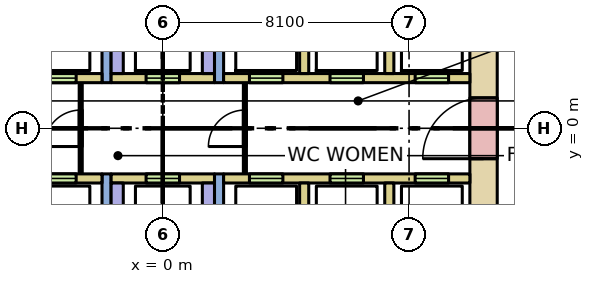
"""IFC4 building model, lengths in metres.
Left out: names, types, materials, properties, quantities, classifications, styles, units other than length and angle.
Written with IfcOpenShell. Run it as: python <this file> out.ifc"""

import sys

from ifc_helpers import new_model, si_unit, direction, frame, frame_2d, origin, place, context, subcontext, project, spatial, rectangle, extrude, element, fill, save


model = new_model("IFC4")
c1 = context("Model", 3, precision=1e-05, world=origin(), true_north=direction((0.0, 1.0)))
c2 = subcontext(c1, "Body", "Model", "MODEL_VIEW")
j1 = project(units=[si_unit("LENGTHUNIT", "METRE"), si_unit("PLANEANGLEUNIT", "RADIAN")], contexts=[c1])
p1 = place(None, origin())
s1 = spatial("IfcSite", under=j1, at=p1, CompositionType="ELEMENT")
p2 = place(p1, origin())
s2 = spatial("IfcBuilding", under=s1, at=p2, CompositionType="ELEMENT")
p3 = place(p2, origin())
s3 = spatial("IfcBuildingStorey", under=s2, at=p3, CompositionType="ELEMENT", Elevation=0.0)
p4 = place(p3, frame((10.55, -5.13, -0.32), z_axis=(0.0, 0.0, 1.0), x_axis=(0.0, 1.0, 0.0)))
e1 = element("IfcWall", 1, at=p4, inside=s3, PredefinedType="SHEAR", context=c2, shape_type="SweptSolid", body=[
    extrude(rectangle(XDim=10.26, YDim=0.9, at=frame_2d((5.13, 0.0))), origin(), (0.0, 0.0, 1.0), 6.0),
])
p5 = place(p4, frame((4.13, 0.0, 0.32)))
e2 = element("IfcOpeningElement", 2, at=p5, cuts=e1, PredefinedType="OPENING", context=c2, shape_type="SweptSolid", body=[
    extrude(rectangle(XDim=2.0, YDim=2.1, at=frame_2d((1.0, 1.05))), frame((0.0, 0.46, 0.0), z_axis=(0.0, -1.0, 0.0), x_axis=(1.0, 0.0, 0.0)), (0.0, 0.0, 1.0), 0.92),
])
p6 = place(p3, frame((-10.1, 1.65, 0.0), z_axis=(0.0, 0.0, 1.0), x_axis=(1.0, 0.0, 0.0)))
e3 = element("IfcWall", 3, at=p6, inside=s3, PredefinedType="SOLIDWALL", context=c2, shape_type="SweptSolid", body=[
    extrude(rectangle(XDim=8.1, YDim=0.3, at=frame_2d((4.05, 0.0))), origin(), (0.0, 0.0, 1.0), 5.68),
])
p7 = place(p6, frame((0.7, 0.0, 0.0)))
e4 = element("IfcOpeningElement", 4, at=p7, cuts=e3, PredefinedType="OPENING", context=c2, shape_type="SweptSolid", body=[
    extrude(rectangle(XDim=1.1, YDim=2.1, at=frame_2d((0.55, 1.05))), frame((0.0, 0.16, 0.0), z_axis=(0.0, -1.0, 0.0), x_axis=(1.0, 0.0, 0.0)), (0.0, 0.0, 1.0), 0.32),
])
p8 = place(p6, frame((3.5, 0.0, 0.0)))
e5 = element("IfcOpeningElement", 5, at=p8, cuts=e3, PredefinedType="OPENING", context=c2, shape_type="SweptSolid", body=[
    extrude(rectangle(XDim=1.1, YDim=2.1, at=frame_2d((0.55, 1.05))), frame((0.0, 0.16, 0.0), z_axis=(0.0, -1.0, 0.0), x_axis=(1.0, 0.0, 0.0)), (0.0, 0.0, 1.0), 0.32),
])
p9 = place(p6, frame((6.15, 0.0, 0.0)))
e6 = element("IfcOpeningElement", 6, at=p9, cuts=e3, PredefinedType="OPENING", context=c2, shape_type="SweptSolid", body=[
    extrude(rectangle(XDim=1.1, YDim=2.1, at=frame_2d((0.55, 1.05))), frame((0.0, 0.16, 0.0), z_axis=(0.0, -1.0, 0.0), x_axis=(1.0, 0.0, 0.0)), (0.0, 0.0, 1.0), 0.32),
])
p10 = place(p3, frame((-10.1, -1.65, 0.0), z_axis=(0.0, 0.0, 1.0), x_axis=(1.0, 0.0, 0.0)))
e7 = element("IfcWall", 7, at=p10, inside=s3, PredefinedType="SOLIDWALL", context=c2, shape_type="SweptSolid", body=[
    extrude(rectangle(XDim=8.1, YDim=0.3, at=frame_2d((4.05, 0.0))), origin(), (0.0, 0.0, 1.0), 5.68),
])
p11 = place(p10, frame((0.7, 0.0, 0.0)))
e8 = element("IfcOpeningElement", 8, at=p11, cuts=e7, PredefinedType="OPENING", context=c2, shape_type="SweptSolid", body=[
    extrude(rectangle(XDim=1.1, YDim=2.1, at=frame_2d((0.55, 1.05))), frame((0.0, 0.16, 0.0), z_axis=(0.0, -1.0, 0.0), x_axis=(1.0, 0.0, 0.0)), (0.0, 0.0, 1.0), 0.32),
])
p12 = place(p10, frame((3.5, 0.0, 0.0)))
e9 = element("IfcOpeningElement", 9, at=p12, cuts=e7, PredefinedType="OPENING", context=c2, shape_type="SweptSolid", body=[
    extrude(rectangle(XDim=1.1, YDim=2.1, at=frame_2d((0.55, 1.05))), frame((0.0, 0.16, 0.0), z_axis=(0.0, -1.0, 0.0), x_axis=(1.0, 0.0, 0.0)), (0.0, 0.0, 1.0), 0.32),
])
p13 = place(p10, frame((6.15, 0.0, 0.0)))
e10 = element("IfcOpeningElement", 10, at=p13, cuts=e7, PredefinedType="OPENING", context=c2, shape_type="SweptSolid", body=[
    extrude(rectangle(XDim=1.1, YDim=2.1, at=frame_2d((0.55, 1.05))), frame((0.0, 0.16, 0.0), z_axis=(0.0, -1.0, 0.0), x_axis=(1.0, 0.0, 0.0)), (0.0, 0.0, 1.0), 0.32),
])
p14 = place(p3, frame((2.0, 1.65, 0.0), z_axis=(0.0, 0.0, 1.0), x_axis=(1.0, 0.0, 0.0)))
e11 = element("IfcWall", 11, at=p14, inside=s3, PredefinedType="SOLIDWALL", context=c2, shape_type="SweptSolid", body=[
    extrude(rectangle(XDim=8.1, YDim=0.3, at=frame_2d((4.05, 0.0))), origin(), (0.0, 0.0, 1.0), 5.68),
])
p15 = place(p14, frame((0.85, 0.0, 0.0)))
e12 = element("IfcOpeningElement", 12, at=p15, cuts=e11, PredefinedType="OPENING", context=c2, shape_type="SweptSolid", body=[
    extrude(rectangle(XDim=1.1, YDim=2.1, at=frame_2d((0.55, 1.05))), frame((0.0, 0.16, 0.0), z_axis=(0.0, -1.0, 0.0), x_axis=(1.0, 0.0, 0.0)), (0.0, 0.0, 1.0), 0.32),
])
p16 = place(p14, frame((3.5, 0.0, 0.0)))
e13 = element("IfcOpeningElement", 13, at=p16, cuts=e11, PredefinedType="OPENING", context=c2, shape_type="SweptSolid", body=[
    extrude(rectangle(XDim=1.1, YDim=2.1, at=frame_2d((0.55, 1.05))), frame((0.0, 0.16, 0.0), z_axis=(0.0, -1.0, 0.0), x_axis=(1.0, 0.0, 0.0)), (0.0, 0.0, 1.0), 0.32),
])
p17 = place(p14, frame((6.3, 0.0, 0.0)))
e14 = element("IfcOpeningElement", 14, at=p17, cuts=e11, PredefinedType="OPENING", context=c2, shape_type="SweptSolid", body=[
    extrude(rectangle(XDim=1.1, YDim=2.1, at=frame_2d((0.55, 1.05))), frame((0.0, 0.16, 0.0), z_axis=(0.0, -1.0, 0.0), x_axis=(1.0, 0.0, 0.0)), (0.0, 0.0, 1.0), 0.32),
])
p18 = place(p3, frame((2.0, -1.65, 0.0), z_axis=(0.0, 0.0, 1.0), x_axis=(1.0, 0.0, 0.0)))
e15 = element("IfcWall", 15, at=p18, inside=s3, PredefinedType="SOLIDWALL", context=c2, shape_type="SweptSolid", body=[
    extrude(rectangle(XDim=8.1, YDim=0.3, at=frame_2d((4.05, 0.0))), origin(), (0.0, 0.0, 1.0), 5.68),
])
p19 = place(p18, frame((0.85, 0.0, 0.0)))
e16 = element("IfcOpeningElement", 16, at=p19, cuts=e15, PredefinedType="OPENING", context=c2, shape_type="SweptSolid", body=[
    extrude(rectangle(XDim=1.1, YDim=2.1, at=frame_2d((0.55, 1.05))), frame((0.0, 0.16, 0.0), z_axis=(0.0, -1.0, 0.0), x_axis=(1.0, 0.0, 0.0)), (0.0, 0.0, 1.0), 0.32),
])
p20 = place(p18, frame((3.5, 0.0, 0.0)))
e17 = element("IfcOpeningElement", 17, at=p20, cuts=e15, PredefinedType="OPENING", context=c2, shape_type="SweptSolid", body=[
    extrude(rectangle(XDim=1.1, YDim=2.1, at=frame_2d((0.55, 1.05))), frame((0.0, 0.16, 0.0), z_axis=(0.0, -1.0, 0.0), x_axis=(1.0, 0.0, 0.0)), (0.0, 0.0, 1.0), 0.32),
])
p21 = place(p18, frame((6.3, 0.0, 0.0)))
e18 = element("IfcOpeningElement", 18, at=p21, cuts=e15, PredefinedType="OPENING", context=c2, shape_type="SweptSolid", body=[
    extrude(rectangle(XDim=1.1, YDim=2.1, at=frame_2d((0.55, 1.05))), frame((0.0, 0.16, 0.0), z_axis=(0.0, -1.0, 0.0), x_axis=(1.0, 0.0, 0.0)), (0.0, 0.0, 1.0), 0.32),
])
for number, where, z_axis, x_axis in (
    (19, (4.65, 1.8, 0.0), (0.0, 0.0, 1.0), (0.0, 1.0, 0.0)),
    (20, (4.65, -4.2, 0.0), (0.0, 0.0, 1.0), (0.0, 1.0, 0.0)),
    (21, (7.45, 1.8, 0.0), (0.0, 0.0, 1.0), (0.0, 1.0, 0.0)),
    (22, (7.45, -4.2, 0.0), (0.0, 0.0, 1.0), (0.0, 1.0, 0.0)),
):
    element("IfcWall", number, at=place(p3, frame(where, z_axis=z_axis, x_axis=x_axis)), inside=s3, PredefinedType="SOLIDWALL", context=c2, shape_type="SweptSolid", body=[
        extrude(rectangle(XDim=2.4, YDim=0.3, at=frame_2d((1.2, 0.0))), origin(), (0.0, 0.0, 1.0), 5.68),
    ])
for number, where, z_axis, x_axis in (
    (23, (-1.85, 1.5, 0.0), (0.0, 0.0, 1.0), (0.0, 1.0, 0.0)),
    (24, (-1.85, -8.1, 0.0), (0.0, 0.0, 1.0), (0.0, 1.0, 0.0)),
    (25, (1.85, 1.5, 0.0), (0.0, 0.0, 1.0), (0.0, 1.0, 0.0)),
    (26, (1.85, -8.1, 0.0), (0.0, 0.0, 1.0), (0.0, 1.0, 0.0)),
):
    element("IfcWall", number, at=place(p3, frame(where, z_axis=z_axis, x_axis=x_axis)), inside=s3, PredefinedType="SHEAR", context=c2, shape_type="SweptSolid", body=[
        extrude(rectangle(XDim=6.6, YDim=0.3, at=frame_2d((3.3, 0.0))), origin(), (0.0, 0.0, 1.0), 5.68),
    ])
p22 = place(p3, frame((-1.7, 1.65, 0.0), z_axis=(0.0, 0.0, 1.0), x_axis=(1.0, 0.0, 0.0)))
e27 = element("IfcWall", 27, at=p22, inside=s3, PredefinedType="SOLIDWALL", context=c2, shape_type="SweptSolid", body=[
    extrude(rectangle(XDim=3.4, YDim=0.3, at=frame_2d((1.7, 0.0))), origin(), (0.0, 0.0, 1.0), 5.68),
])
p23 = place(p22, frame((1.15, 0.0, 0.0)))
e28 = element("IfcOpeningElement", 28, at=p23, cuts=e27, PredefinedType="OPENING", context=c2, shape_type="SweptSolid", body=[
    extrude(rectangle(XDim=1.1, YDim=2.1, at=frame_2d((0.55, 1.05))), frame((0.0, 0.16, 0.0), z_axis=(0.0, -1.0, 0.0), x_axis=(1.0, 0.0, 0.0)), (0.0, 0.0, 1.0), 0.32),
])
p24 = place(p3, frame((-1.7, -1.65, 0.0), z_axis=(0.0, 0.0, 1.0), x_axis=(1.0, 0.0, 0.0)))
e29 = element("IfcWall", 29, at=p24, inside=s3, PredefinedType="SOLIDWALL", context=c2, shape_type="SweptSolid", body=[
    extrude(rectangle(XDim=3.4, YDim=0.3, at=frame_2d((1.7, 0.0))), origin(), (0.0, 0.0, 1.0), 5.68),
])
p25 = place(p24, frame((1.15, 0.0, 0.0)))
e30 = element("IfcOpeningElement", 30, at=p25, cuts=e29, PredefinedType="OPENING", context=c2, shape_type="SweptSolid", body=[
    extrude(rectangle(XDim=1.1, YDim=2.1, at=frame_2d((0.55, 1.05))), frame((0.0, 0.16, 0.0), z_axis=(0.0, -1.0, 0.0), x_axis=(1.0, 0.0, 0.0)), (0.0, 0.0, 1.0), 0.32),
])
for number, where, z_axis, x_axis in (
    (31, (-1.5, 1.8, 0.0), (0.0, 0.0, 1.0), (0.0, 1.0, 0.0)),
    (32, (-1.5, -4.8, 0.0), (0.0, 0.0, 1.0), (0.0, 1.0, 0.0)),
    (33, (1.5, 1.8, 0.0), (0.0, 0.0, 1.0), (0.0, 1.0, 0.0)),
    (34, (1.5, -4.8, 0.0), (0.0, 0.0, 1.0), (0.0, 1.0, 0.0)),
):
    element("IfcWall", number, at=place(p3, frame(where, z_axis=z_axis, x_axis=x_axis)), inside=s3, PredefinedType="SOLIDWALL", context=c2, shape_type="SweptSolid", body=[
        extrude(rectangle(XDim=3.0, YDim=0.4, at=frame_2d((1.5, 0.0))), origin(), (0.0, 0.0, 1.0), 5.68),
    ])
p26 = place(p3, frame((-2.7, -1.5, 0.0), z_axis=(0.0, 0.0, 1.0), x_axis=(0.0, 1.0, 0.0)))
e35 = element("IfcWall", 35, at=p26, inside=s3, PredefinedType="PARTITIONING", context=c2, shape_type="SweptSolid", body=[
    extrude(rectangle(XDim=3.0, YDim=0.1, at=frame_2d((1.5, 0.0))), origin(), (0.0, 0.0, 1.0), 5.68),
])
p27 = place(p26, frame((0.9, 0.0, 0.0)))
e36 = element("IfcOpeningElement", 36, at=p27, cuts=e35, PredefinedType="OPENING", context=c2, shape_type="SweptSolid", body=[
    extrude(rectangle(XDim=1.2, YDim=2.1, at=frame_2d((0.6, 1.05))), frame((0.0, 0.06, 0.0), z_axis=(0.0, -1.0, 0.0), x_axis=(1.0, 0.0, 0.0)), (0.0, 0.0, 1.0), 0.12),
])
p28 = place(p3, frame((2.7, -1.5, 0.0), z_axis=(0.0, 0.0, 1.0), x_axis=(0.0, 1.0, 0.0)))
e37 = element("IfcWall", 37, at=p28, inside=s3, PredefinedType="PARTITIONING", context=c2, shape_type="SweptSolid", body=[
    extrude(rectangle(XDim=3.0, YDim=0.1, at=frame_2d((1.5, 0.0))), origin(), (0.0, 0.0, 1.0), 5.68),
])
p29 = place(p28, frame((0.9, 0.0, 0.0)))
e38 = element("IfcOpeningElement", 38, at=p29, cuts=e37, PredefinedType="OPENING", context=c2, shape_type="SweptSolid", body=[
    extrude(rectangle(XDim=1.2, YDim=2.1, at=frame_2d((0.6, 1.05))), frame((0.0, 0.06, 0.0), z_axis=(0.0, -1.0, 0.0), x_axis=(1.0, 0.0, 0.0)), (0.0, 0.0, 1.0), 0.12),
])
p30 = place(p9, origin())
e39 = element("IfcDoor", 39, at=p30, inside=s3, OperationType="DOUBLE_DOOR_SLIDING", PredefinedType="DOOR", context=c2, shape_type="SweptSolid", body=[
    extrude(rectangle(XDim=1.1, YDim=2.1, at=frame_2d((0.55, 1.05))), frame((0.0, 0.025, 0.0), z_axis=(0.0, -1.0, 0.0), x_axis=(1.0, 0.0, 0.0)), (0.0, 0.0, 1.0), 0.05),
])
fill(e6, e39)
p31 = place(p13, origin())
e40 = element("IfcDoor", 40, at=p31, inside=s3, OperationType="DOUBLE_DOOR_SLIDING", PredefinedType="DOOR", context=c2, shape_type="SweptSolid", body=[
    extrude(rectangle(XDim=1.1, YDim=2.1, at=frame_2d((0.55, 1.05))), frame((0.0, 0.025, 0.0), z_axis=(0.0, -1.0, 0.0), x_axis=(1.0, 0.0, 0.0)), (0.0, 0.0, 1.0), 0.05),
])
fill(e10, e40)
p32 = place(p15, origin())
e41 = element("IfcDoor", 41, at=p32, inside=s3, OperationType="DOUBLE_DOOR_SLIDING", PredefinedType="DOOR", context=c2, shape_type="SweptSolid", body=[
    extrude(rectangle(XDim=1.1, YDim=2.1, at=frame_2d((0.55, 1.05))), frame((0.0, 0.025, 0.0), z_axis=(0.0, -1.0, 0.0), x_axis=(1.0, 0.0, 0.0)), (0.0, 0.0, 1.0), 0.05),
])
fill(e12, e41)
p33 = place(p16, origin())
e42 = element("IfcDoor", 42, at=p33, inside=s3, OperationType="DOUBLE_DOOR_SLIDING", PredefinedType="DOOR", context=c2, shape_type="SweptSolid", body=[
    extrude(rectangle(XDim=1.1, YDim=2.1, at=frame_2d((0.55, 1.05))), frame((0.0, 0.025, 0.0), z_axis=(0.0, -1.0, 0.0), x_axis=(1.0, 0.0, 0.0)), (0.0, 0.0, 1.0), 0.05),
])
fill(e13, e42)
p34 = place(p17, origin())
e43 = element("IfcDoor", 43, at=p34, inside=s3, OperationType="DOUBLE_DOOR_SLIDING", PredefinedType="DOOR", context=c2, shape_type="SweptSolid", body=[
    extrude(rectangle(XDim=1.1, YDim=2.1, at=frame_2d((0.55, 1.05))), frame((0.0, 0.025, 0.0), z_axis=(0.0, -1.0, 0.0), x_axis=(1.0, 0.0, 0.0)), (0.0, 0.0, 1.0), 0.05),
])
fill(e14, e43)
p35 = place(p19, origin())
e44 = element("IfcDoor", 44, at=p35, inside=s3, OperationType="DOUBLE_DOOR_SLIDING", PredefinedType="DOOR", context=c2, shape_type="SweptSolid", body=[
    extrude(rectangle(XDim=1.1, YDim=2.1, at=frame_2d((0.55, 1.05))), frame((0.0, 0.025, 0.0), z_axis=(0.0, -1.0, 0.0), x_axis=(1.0, 0.0, 0.0)), (0.0, 0.0, 1.0), 0.05),
])
fill(e16, e44)
p36 = place(p20, origin())
e45 = element("IfcDoor", 45, at=p36, inside=s3, OperationType="DOUBLE_DOOR_SLIDING", PredefinedType="DOOR", context=c2, shape_type="SweptSolid", body=[
    extrude(rectangle(XDim=1.1, YDim=2.1, at=frame_2d((0.55, 1.05))), frame((0.0, 0.025, 0.0), z_axis=(0.0, -1.0, 0.0), x_axis=(1.0, 0.0, 0.0)), (0.0, 0.0, 1.0), 0.05),
])
fill(e17, e45)
p37 = place(p21, origin())
e46 = element("IfcDoor", 46, at=p37, inside=s3, OperationType="DOUBLE_DOOR_SLIDING", PredefinedType="DOOR", context=c2, shape_type="SweptSolid", body=[
    extrude(rectangle(XDim=1.1, YDim=2.1, at=frame_2d((0.55, 1.05))), frame((0.0, 0.025, 0.0), z_axis=(0.0, -1.0, 0.0), x_axis=(1.0, 0.0, 0.0)), (0.0, 0.0, 1.0), 0.05),
])
fill(e18, e46)
p38 = place(p23, origin())
e47 = element("IfcDoor", 47, at=p38, inside=s3, OperationType="DOUBLE_DOOR_SLIDING", PredefinedType="DOOR", context=c2, shape_type="SweptSolid", body=[
    extrude(rectangle(XDim=1.1, YDim=2.1, at=frame_2d((0.55, 1.05))), frame((0.0, 0.025, 0.0), z_axis=(0.0, -1.0, 0.0), x_axis=(1.0, 0.0, 0.0)), (0.0, 0.0, 1.0), 0.05),
])
fill(e28, e47)
p39 = place(p25, origin())
e48 = element("IfcDoor", 48, at=p39, inside=s3, OperationType="DOUBLE_DOOR_SLIDING", PredefinedType="DOOR", context=c2, shape_type="SweptSolid", body=[
    extrude(rectangle(XDim=1.1, YDim=2.1, at=frame_2d((0.55, 1.05))), frame((0.0, 0.025, 0.0), z_axis=(0.0, -1.0, 0.0), x_axis=(1.0, 0.0, 0.0)), (0.0, 0.0, 1.0), 0.05),
])
fill(e30, e48)
p40 = place(p5, origin())
e49 = element("IfcDoor", 49, at=p40, inside=s3, OperationType="DOUBLE_DOOR_SINGLE_SWING", PredefinedType="DOOR", context=c2, shape_type="SweptSolid", body=[
    extrude(rectangle(XDim=2.0, YDim=2.1, at=frame_2d((1.0, 1.05))), frame((0.0, 0.025, 0.0), z_axis=(0.0, -1.0, 0.0), x_axis=(1.0, 0.0, 0.0)), (0.0, 0.0, 1.0), 0.05),
])
fill(e2, e49)
p41 = place(p27, origin())
e50 = element("IfcDoor", 50, at=p41, inside=s3, OperationType="SINGLE_SWING_LEFT", PredefinedType="DOOR", context=c2, shape_type="SweptSolid", body=[
    extrude(rectangle(XDim=1.2, YDim=2.1, at=frame_2d((0.6, 1.05))), frame((0.0, 0.025, 0.0), z_axis=(0.0, -1.0, 0.0), x_axis=(1.0, 0.0, 0.0)), (0.0, 0.0, 1.0), 0.05),
])
fill(e36, e50)
p42 = place(p29, origin())
e51 = element("IfcDoor", 51, at=p42, inside=s3, OperationType="SINGLE_SWING_LEFT", PredefinedType="DOOR", context=c2, shape_type="SweptSolid", body=[
    extrude(rectangle(XDim=1.2, YDim=2.1, at=frame_2d((0.6, 1.05))), frame((0.0, 0.025, 0.0), z_axis=(0.0, -1.0, 0.0), x_axis=(1.0, 0.0, 0.0)), (0.0, 0.0, 1.0), 0.05),
])
fill(e38, e51)
save(model, sys.argv[1])
